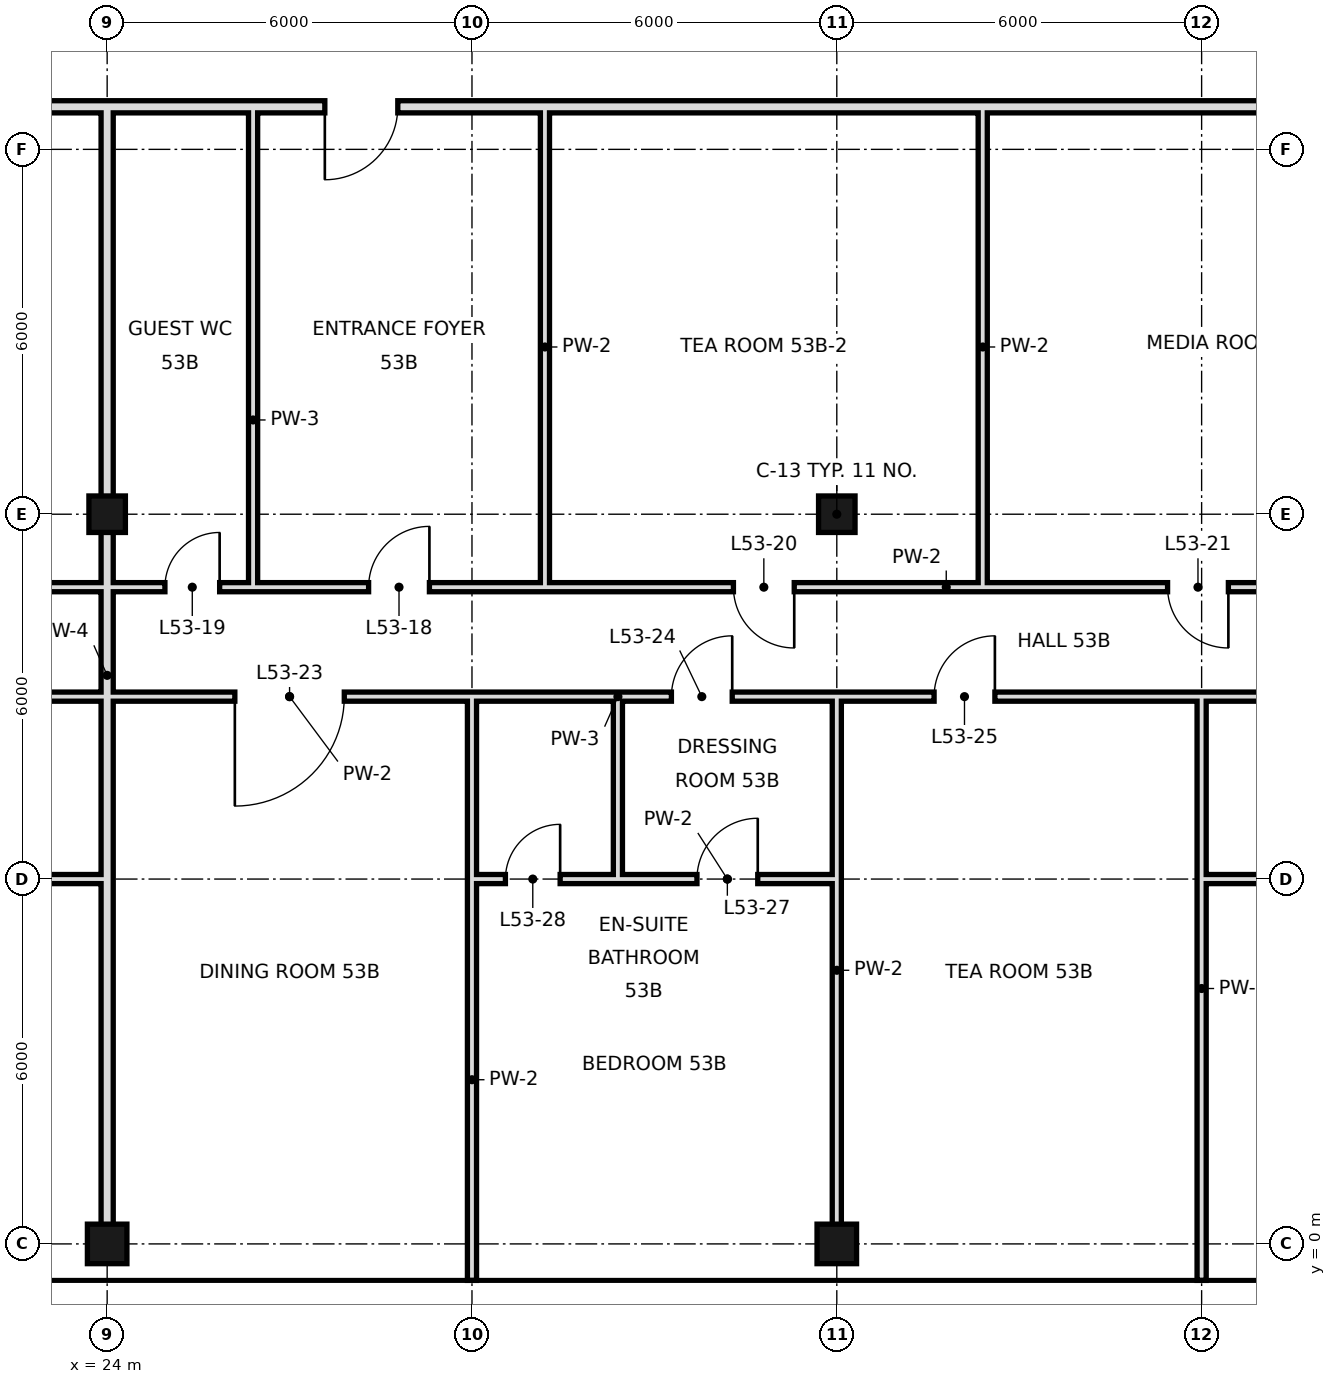
"""IFC4 building model, lengths in metres.
Left out: names, types, materials, properties, quantities, classifications, styles, units other than length and angle.
Written with IfcOpenShell. Run it as: python <this file> out.ifc"""

import sys

from ifc_helpers import new_model, si_unit, direction, frame, frame_2d, origin, origin_2d, place, context, subcontext, project, spatial, rectangle, hollow_rectangle, extrude, element, fill, save


model = new_model("IFC4")
c1 = context("Model", 3, precision=1e-05, world=origin(), true_north=direction((0.0, 1.0)))
c2 = subcontext(c1, "Body", "Model", "MODEL_VIEW")
j1 = project(units=[si_unit("LENGTHUNIT", "METRE"), si_unit("PLANEANGLEUNIT", "RADIAN")], contexts=[c1])
p1 = place(None, origin())
s1 = spatial("IfcSite", under=j1, at=p1, CompositionType="ELEMENT")
p2 = place(p1, origin())
s2 = spatial("IfcBuilding", under=s1, at=p2, CompositionType="ELEMENT")
p3 = place(p2, frame((0.0, 0.0, 226.2)))
s3 = spatial("IfcBuildingStorey", under=s2, at=p3, CompositionType="ELEMENT", Elevation=226.2)
p4 = place(p3, frame((24.0, 0.0, 0.0), z_axis=(0.0, 0.0, 1.0), x_axis=(1.0, 0.0, 0.0)))
e1 = element("IfcColumn", 1, at=p4, inside=s3, PredefinedType="COLUMN", context=c2, shape_type="SweptSolid", body=[
    extrude(hollow_rectangle(XDim=0.65, YDim=0.65, WallThickness=0.032, at=origin_2d()), origin(), (0.0, 0.0, 1.0), 3.6),
])
p5 = place(p3, frame((24.0, 12.0, 0.0), z_axis=(0.0, 0.0, 1.0), x_axis=(1.0, 0.0, 0.0)))
e2 = element("IfcColumn", 2, at=p5, inside=s3, PredefinedType="COLUMN", context=c2, shape_type="SweptSolid", body=[
    extrude(hollow_rectangle(XDim=0.6, YDim=0.6, WallThickness=0.028, at=origin_2d()), origin(), (0.0, 0.0, 1.0), 3.6),
])
p6 = place(p3, frame((36.0, 0.0, 0.0), z_axis=(0.0, 0.0, 1.0), x_axis=(1.0, 0.0, 0.0)))
e3 = element("IfcColumn", 3, at=p6, inside=s3, PredefinedType="COLUMN", context=c2, shape_type="SweptSolid", body=[
    extrude(hollow_rectangle(XDim=0.65, YDim=0.65, WallThickness=0.032, at=origin_2d()), origin(), (0.0, 0.0, 1.0), 3.6),
])
p7 = place(p3, frame((36.0, 12.0, 0.0), z_axis=(0.0, 0.0, 1.0), x_axis=(1.0, 0.0, 0.0)))
e4 = element("IfcColumn", 4, at=p7, inside=s3, PredefinedType="COLUMN", context=c2, shape_type="SweptSolid", body=[
    extrude(hollow_rectangle(XDim=0.6, YDim=0.6, WallThickness=0.028, at=origin_2d()), origin(), (0.0, 0.0, 1.0), 3.6),
])
p8 = place(p3, frame((24.0, 0.0, 0.0), z_axis=(0.0, 0.0, 1.0), x_axis=(0.0, 1.0, 0.0)))
e5 = element("IfcWall", 5, at=p8, inside=s3, PredefinedType="SOLIDWALL", context=c2, shape_type="SweptSolid", body=[
    extrude(rectangle(XDim=18.7, YDim=0.2, at=frame_2d((9.35, 0.0))), origin(), (0.0, 0.0, 1.0), 2.72),
])
p9 = place(p3, frame((26.4, 10.8, 0.0), z_axis=(0.0, 0.0, 1.0), x_axis=(0.0, 1.0, 0.0)))
e6 = element("IfcWall", 6, at=p9, inside=s3, PredefinedType="PARTITIONING", context=c2, shape_type="SweptSolid", body=[
    extrude(rectangle(XDim=7.9, YDim=0.15, at=frame_2d((3.95, 0.0))), origin(), (0.0, 0.0, 1.0), 3.42),
])
p10 = place(p3, frame((30.0, -0.6, 0.0), z_axis=(0.0, 0.0, 1.0), x_axis=(0.0, 1.0, 0.0)))
e7 = element("IfcWall", 7, at=p10, inside=s3, PredefinedType="PARTITIONING", context=c2, shape_type="SweptSolid", body=[
    extrude(rectangle(XDim=6.6, YDim=0.15, at=frame_2d((3.3, 0.0))), origin(), (0.0, 0.0, 1.0), 2.72),
])
p11 = place(p3, frame((30.0, 6.0, 0.0), z_axis=(0.0, 0.0, 1.0), x_axis=(0.0, 1.0, 0.0)))
e8 = element("IfcWall", 8, at=p11, inside=s3, PredefinedType="PARTITIONING", context=c2, shape_type="SweptSolid", body=[
    extrude(rectangle(XDim=3.0, YDim=0.15, at=frame_2d((1.5, 0.0))), origin(), (0.0, 0.0, 1.0), 2.72),
])
p12 = place(p3, frame((31.2, 10.8, 0.0), z_axis=(0.0, 0.0, 1.0), x_axis=(0.0, 1.0, 0.0)))
e9 = element("IfcWall", 9, at=p12, inside=s3, PredefinedType="PARTITIONING", context=c2, shape_type="SweptSolid", body=[
    extrude(rectangle(XDim=7.9, YDim=0.15, at=frame_2d((3.95, 0.0))), origin(), (0.0, 0.0, 1.0), 3.42),
])
p13 = place(p3, frame((32.4, 6.0, 0.0), z_axis=(0.0, 0.0, 1.0), x_axis=(0.0, 1.0, 0.0)))
e10 = element("IfcWall", 10, at=p13, inside=s3, PredefinedType="PARTITIONING", context=c2, shape_type="SweptSolid", body=[
    extrude(rectangle(XDim=3.0, YDim=0.15, at=frame_2d((1.5, 0.0))), origin(), (0.0, 0.0, 1.0), 3.42),
])
p14 = place(p3, frame((36.0, 0.0, 0.0), z_axis=(0.0, 0.0, 1.0), x_axis=(0.0, 1.0, 0.0)))
e11 = element("IfcWall", 11, at=p14, inside=s3, PredefinedType="PARTITIONING", context=c2, shape_type="SweptSolid", body=[
    extrude(rectangle(XDim=9.0, YDim=0.15, at=frame_2d((4.5, 0.0))), origin(), (0.0, 0.0, 1.0), 2.72),
])
p15 = place(p3, frame((38.4, 10.8, 0.0), z_axis=(0.0, 0.0, 1.0), x_axis=(0.0, 1.0, 0.0)))
e12 = element("IfcWall", 12, at=p15, inside=s3, PredefinedType="PARTITIONING", context=c2, shape_type="SweptSolid", body=[
    extrude(rectangle(XDim=7.9, YDim=0.15, at=frame_2d((3.95, 0.0))), origin(), (0.0, 0.0, 1.0), 3.42),
])
p16 = place(p3, frame((42.0, -0.6, 0.0), z_axis=(0.0, 0.0, 1.0), x_axis=(0.0, 1.0, 0.0)))
e13 = element("IfcWall", 13, at=p16, inside=s3, PredefinedType="PARTITIONING", context=c2, shape_type="SweptSolid", body=[
    extrude(rectangle(XDim=9.6, YDim=0.15, at=frame_2d((4.8, 0.0))), origin(), (0.0, 0.0, 1.0), 2.72),
])
p17 = place(p3, frame((7.2, 10.8, 0.0), z_axis=(0.0, 0.0, 1.0), x_axis=(1.0, 0.0, 0.0)))
e14 = element("IfcWall", 14, at=p17, inside=s3, PredefinedType="PARTITIONING", context=c2, shape_type="SweptSolid", body=[
    extrude(rectangle(XDim=16.8, YDim=0.15, at=frame_2d((8.4, 0.0))), origin(), (0.0, 0.0, 1.0), 3.42),
])
p18 = place(p17, frame((1.6, 0.0, 0.0)))
e15 = element("IfcOpeningElement", 15, at=p18, cuts=e14, PredefinedType="OPENING", context=c2, shape_type="SweptSolid", body=[
    extrude(rectangle(XDim=1.0, YDim=2.4, at=frame_2d((0.5, 1.2))), frame((0.0, 0.085, 0.0), z_axis=(0.0, -1.0, 0.0), x_axis=(1.0, 0.0, 0.0)), (0.0, 0.0, 1.0), 0.17),
])
p19 = place(p17, frame((10.9, 0.0, 0.0)))
e16 = element("IfcOpeningElement", 16, at=p19, cuts=e14, PredefinedType="OPENING", context=c2, shape_type="SweptSolid", body=[
    extrude(rectangle(XDim=1.0, YDim=2.4, at=frame_2d((0.5, 1.2))), frame((0.0, 0.085, 0.0), z_axis=(0.0, -1.0, 0.0), x_axis=(1.0, 0.0, 0.0)), (0.0, 0.0, 1.0), 0.17),
])
p20 = place(p3, frame((26.4, 10.8, 0.0), z_axis=(0.0, 0.0, 1.0), x_axis=(1.0, 0.0, 0.0)))
e17 = element("IfcWall", 17, at=p20, inside=s3, PredefinedType="PARTITIONING", context=c2, shape_type="SweptSolid", body=[
    extrude(rectangle(XDim=22.8, YDim=0.15, at=frame_2d((11.4, 0.0))), origin(), (0.0, 0.0, 1.0), 3.42),
])
p21 = place(p20, frame((1.9, 0.0, 0.0)))
e18 = element("IfcOpeningElement", 18, at=p21, cuts=e17, PredefinedType="OPENING", context=c2, shape_type="SweptSolid", body=[
    extrude(rectangle(XDim=1.0, YDim=2.4, at=frame_2d((0.5, 1.2))), frame((0.0, 0.085, 0.0), z_axis=(0.0, -1.0, 0.0), x_axis=(1.0, 0.0, 0.0)), (0.0, 0.0, 1.0), 0.17),
])
p22 = place(p20, frame((7.9, 0.0, 0.0)))
e19 = element("IfcOpeningElement", 19, at=p22, cuts=e17, PredefinedType="OPENING", context=c2, shape_type="SweptSolid", body=[
    extrude(rectangle(XDim=1.0, YDim=2.4, at=frame_2d((0.5, 1.2))), frame((0.0, 0.085, 0.0), z_axis=(0.0, -1.0, 0.0), x_axis=(1.0, 0.0, 0.0)), (0.0, 0.0, 1.0), 0.17),
])
p23 = place(p20, frame((15.04, 0.0, 0.0)))
e20 = element("IfcOpeningElement", 20, at=p23, cuts=e17, PredefinedType="OPENING", context=c2, shape_type="SweptSolid", body=[
    extrude(rectangle(XDim=1.0, YDim=2.4, at=frame_2d((0.5, 1.2))), frame((0.0, 0.085, 0.0), z_axis=(0.0, -1.0, 0.0), x_axis=(1.0, 0.0, 0.0)), (0.0, 0.0, 1.0), 0.17),
])
p24 = place(p3, frame((24.0, 10.8, 0.0), z_axis=(0.0, 0.0, 1.0), x_axis=(1.0, 0.0, 0.0)))
e21 = element("IfcWall", 21, at=p24, inside=s3, PredefinedType="PARTITIONING", context=c2, shape_type="SweptSolid", body=[
    extrude(rectangle(XDim=2.4, YDim=0.15, at=frame_2d((1.2, 0.0))), origin(), (0.0, 0.0, 1.0), 3.42),
])
p25 = place(p24, frame((0.95, 0.0, 0.0)))
e22 = element("IfcOpeningElement", 22, at=p25, cuts=e21, PredefinedType="OPENING", context=c2, shape_type="SweptSolid", body=[
    extrude(rectangle(XDim=0.9, YDim=2.4, at=frame_2d((0.45, 1.2))), frame((0.0, 0.085, 0.0), z_axis=(0.0, -1.0, 0.0), x_axis=(1.0, 0.0, 0.0)), (0.0, 0.0, 1.0), 0.17),
])
p26 = place(p3, frame((3.1, 18.7, 0.0), z_axis=(0.0, 0.0, 1.0), x_axis=(1.0, 0.0, 0.0)))
e23 = element("IfcWall", 23, at=p26, inside=s3, PredefinedType="SOLIDWALL", context=c2, shape_type="SweptSolid", body=[
    extrude(rectangle(XDim=41.8, YDim=0.2, at=frame_2d((20.9, 0.0))), origin(), (0.0, 0.0, 1.0), 2.72),
])
p27 = place(p26, frame((7.36, 0.0, 0.0)))
e24 = element("IfcOpeningElement", 24, at=p27, cuts=e23, PredefinedType="OPENING", context=c2, shape_type="SweptSolid", body=[
    extrude(rectangle(XDim=1.2, YDim=2.4, at=frame_2d((0.6, 1.2))), frame((0.0, 0.11, 0.0), z_axis=(0.0, -1.0, 0.0), x_axis=(1.0, 0.0, 0.0)), (0.0, 0.0, 1.0), 0.22),
])
p28 = place(p26, frame((24.48, 0.0, 0.0)))
e25 = element("IfcOpeningElement", 25, at=p28, cuts=e23, PredefinedType="OPENING", context=c2, shape_type="SweptSolid", body=[
    extrude(rectangle(XDim=1.2, YDim=2.4, at=frame_2d((0.6, 1.2))), frame((0.0, 0.11, 0.0), z_axis=(0.0, -1.0, 0.0), x_axis=(1.0, 0.0, 0.0)), (0.0, 0.0, 1.0), 0.22),
])
p29 = place(p3, frame((32.4, 6.0, 0.0), z_axis=(0.0, 0.0, 1.0), x_axis=(1.0, 0.0, 0.0)))
e26 = element("IfcWall", 26, at=p29, inside=s3, PredefinedType="PARTITIONING", context=c2, shape_type="SweptSolid", body=[
    extrude(rectangle(XDim=3.6, YDim=0.15, at=frame_2d((1.8, 0.0))), origin(), (0.0, 0.0, 1.0), 2.97),
])
p30 = place(p29, frame((1.3, 0.0, 0.0)))
e27 = element("IfcOpeningElement", 27, at=p30, cuts=e26, PredefinedType="OPENING", context=c2, shape_type="SweptSolid", body=[
    extrude(rectangle(XDim=1.0, YDim=2.4, at=frame_2d((0.5, 1.2))), frame((0.0, 0.085, 0.0), z_axis=(0.0, -1.0, 0.0), x_axis=(1.0, 0.0, 0.0)), (0.0, 0.0, 1.0), 0.17),
])
p31 = place(p3, frame((42.0, 6.0, 0.0), z_axis=(0.0, 0.0, 1.0), x_axis=(1.0, 0.0, 0.0)))
e28 = element("IfcWall", 28, at=p31, inside=s3, PredefinedType="PARTITIONING", context=c2, shape_type="SweptSolid", body=[
    extrude(rectangle(XDim=12.0, YDim=0.15, at=frame_2d((6.0, 0.0))), origin(), (0.0, 0.0, 1.0), 2.97),
])
p32 = place(p31, frame((3.16, 0.0, 0.0)))
e29 = element("IfcOpeningElement", 29, at=p32, cuts=e28, PredefinedType="OPENING", context=c2, shape_type="SweptSolid", body=[
    extrude(rectangle(XDim=1.8, YDim=2.4, at=frame_2d((0.9, 1.2))), frame((0.0, 0.085, 0.0), z_axis=(0.0, -1.0, 0.0), x_axis=(1.0, 0.0, 0.0)), (0.0, 0.0, 1.0), 0.17),
])
p33 = place(p3, frame((20.4, 6.0, 0.0), z_axis=(0.0, 0.0, 1.0), x_axis=(1.0, 0.0, 0.0)))
e30 = element("IfcWall", 30, at=p33, inside=s3, PredefinedType="PARTITIONING", context=c2, shape_type="SweptSolid", body=[
    extrude(rectangle(XDim=3.6, YDim=0.15, at=frame_2d((1.8, 0.0))), origin(), (0.0, 0.0, 1.0), 2.97),
])
p34 = place(p33, frame((0.25, 0.0, 0.0)))
e31 = element("IfcOpeningElement", 31, at=p34, cuts=e30, PredefinedType="OPENING", context=c2, shape_type="SweptSolid", body=[
    extrude(rectangle(XDim=0.9, YDim=2.4, at=frame_2d((0.45, 1.2))), frame((0.0, 0.085, 0.0), z_axis=(0.0, -1.0, 0.0), x_axis=(1.0, 0.0, 0.0)), (0.0, 0.0, 1.0), 0.17),
])
p35 = place(p3, frame((30.0, 6.0, 0.0), z_axis=(0.0, 0.0, 1.0), x_axis=(1.0, 0.0, 0.0)))
e32 = element("IfcWall", 32, at=p35, inside=s3, PredefinedType="PARTITIONING", context=c2, shape_type="SweptSolid", body=[
    extrude(rectangle(XDim=2.4, YDim=0.15, at=frame_2d((1.2, 0.0))), origin(), (0.0, 0.0, 1.0), 2.97),
])
p36 = place(p35, frame((0.55, 0.0, 0.0)))
e33 = element("IfcOpeningElement", 33, at=p36, cuts=e32, PredefinedType="OPENING", context=c2, shape_type="SweptSolid", body=[
    extrude(rectangle(XDim=0.9, YDim=2.4, at=frame_2d((0.45, 1.2))), frame((0.0, 0.085, 0.0), z_axis=(0.0, -1.0, 0.0), x_axis=(1.0, 0.0, 0.0)), (0.0, 0.0, 1.0), 0.17),
])
p37 = place(p3, frame((24.0, 9.0, 0.0), z_axis=(0.0, 0.0, 1.0), x_axis=(1.0, 0.0, 0.0)))
e34 = element("IfcWall", 34, at=p37, inside=s3, PredefinedType="PARTITIONING", context=c2, shape_type="SweptSolid", body=[
    extrude(rectangle(XDim=6.0, YDim=0.15, at=frame_2d((3.0, 0.0))), origin(), (0.0, 0.0, 1.0), 3.42),
])
p38 = place(p37, frame((2.1, 0.0, 0.0)))
e35 = element("IfcOpeningElement", 35, at=p38, cuts=e34, PredefinedType="OPENING", context=c2, shape_type="SweptSolid", body=[
    extrude(rectangle(XDim=1.8, YDim=2.4, at=frame_2d((0.9, 1.2))), frame((0.0, 0.085, 0.0), z_axis=(0.0, -1.0, 0.0), x_axis=(1.0, 0.0, 0.0)), (0.0, 0.0, 1.0), 0.17),
])
p39 = place(p3, frame((32.4, 9.0, 0.0), z_axis=(0.0, 0.0, 1.0), x_axis=(1.0, 0.0, 0.0)))
e36 = element("IfcWall", 36, at=p39, inside=s3, PredefinedType="PARTITIONING", context=c2, shape_type="SweptSolid", body=[
    extrude(rectangle(XDim=22.2, YDim=0.15, at=frame_2d((11.1, 0.0))), origin(), (0.0, 0.0, 1.0), 3.42),
])
p40 = place(p39, frame((0.88, 0.0, 0.0)))
e37 = element("IfcOpeningElement", 37, at=p40, cuts=e36, PredefinedType="OPENING", context=c2, shape_type="SweptSolid", body=[
    extrude(rectangle(XDim=1.0, YDim=2.4, at=frame_2d((0.5, 1.2))), frame((0.0, 0.085, 0.0), z_axis=(0.0, -1.0, 0.0), x_axis=(1.0, 0.0, 0.0)), (0.0, 0.0, 1.0), 0.17),
])
p41 = place(p39, frame((5.2, 0.0, 0.0)))
e38 = element("IfcOpeningElement", 38, at=p41, cuts=e36, PredefinedType="OPENING", context=c2, shape_type="SweptSolid", body=[
    extrude(rectangle(XDim=1.0, YDim=2.4, at=frame_2d((0.5, 1.2))), frame((0.0, 0.085, 0.0), z_axis=(0.0, -1.0, 0.0), x_axis=(1.0, 0.0, 0.0)), (0.0, 0.0, 1.0), 0.17),
])
p42 = place(p39, frame((16.64, 0.0, 0.0)))
e39 = element("IfcOpeningElement", 39, at=p42, cuts=e36, PredefinedType="OPENING", context=c2, shape_type="SweptSolid", body=[
    extrude(rectangle(XDim=1.8, YDim=2.4, at=frame_2d((0.9, 1.2))), frame((0.0, 0.085, 0.0), z_axis=(0.0, -1.0, 0.0), x_axis=(1.0, 0.0, 0.0)), (0.0, 0.0, 1.0), 0.17),
])
p43 = place(p3, frame((20.4, 9.0, 0.0), z_axis=(0.0, 0.0, 1.0), x_axis=(1.0, 0.0, 0.0)))
e40 = element("IfcWall", 40, at=p43, inside=s3, PredefinedType="PARTITIONING", context=c2, shape_type="SweptSolid", body=[
    extrude(rectangle(XDim=3.6, YDim=0.15, at=frame_2d((1.8, 0.0))), origin(), (0.0, 0.0, 1.0), 3.42),
])
p44 = place(p3, frame((30.0, 9.0, 0.0), z_axis=(0.0, 0.0, 1.0), x_axis=(1.0, 0.0, 0.0)))
e41 = element("IfcWall", 41, at=p44, inside=s3, PredefinedType="PARTITIONING", context=c2, shape_type="SweptSolid", body=[
    extrude(rectangle(XDim=2.4, YDim=0.15, at=frame_2d((1.2, 0.0))), origin(), (0.0, 0.0, 1.0), 3.42),
])
p45 = place(p21, frame((1.0, 0.0, 0.0), z_axis=(0.0, 0.0, 1.0), x_axis=(-1.0, 0.0, 0.0)))
e42 = element("IfcDoor", 42, at=p45, inside=s3, OperationType="SINGLE_SWING_LEFT", PredefinedType="DOOR", context=c2, shape_type="SweptSolid", body=[
    extrude(rectangle(XDim=1.0, YDim=2.4, at=frame_2d((0.5, 1.2))), frame((0.0, 0.025, 0.0), z_axis=(0.0, -1.0, 0.0), x_axis=(1.0, 0.0, 0.0)), (0.0, 0.0, 1.0), 0.05),
])
fill(e18, e42)
p46 = place(p25, frame((0.9, 0.0, 0.0), z_axis=(0.0, 0.0, 1.0), x_axis=(-1.0, 0.0, 0.0)))
e43 = element("IfcDoor", 43, at=p46, inside=s3, OperationType="SINGLE_SWING_LEFT", PredefinedType="DOOR", context=c2, shape_type="SweptSolid", body=[
    extrude(rectangle(XDim=0.9, YDim=2.4, at=frame_2d((0.45, 1.2))), frame((0.0, 0.025, 0.0), z_axis=(0.0, -1.0, 0.0), x_axis=(1.0, 0.0, 0.0)), (0.0, 0.0, 1.0), 0.05),
])
fill(e22, e43)
p47 = place(p22, origin())
e44 = element("IfcDoor", 44, at=p47, inside=s3, OperationType="SINGLE_SWING_RIGHT", PredefinedType="DOOR", context=c2, shape_type="SweptSolid", body=[
    extrude(rectangle(XDim=1.0, YDim=2.4, at=frame_2d((0.5, 1.2))), frame((0.0, 0.025, 0.0), z_axis=(0.0, -1.0, 0.0), x_axis=(1.0, 0.0, 0.0)), (0.0, 0.0, 1.0), 0.05),
])
fill(e19, e44)
p48 = place(p23, origin())
e45 = element("IfcDoor", 45, at=p48, inside=s3, OperationType="SINGLE_SWING_RIGHT", PredefinedType="DOOR", context=c2, shape_type="SweptSolid", body=[
    extrude(rectangle(XDim=1.0, YDim=2.4, at=frame_2d((0.5, 1.2))), frame((0.0, 0.025, 0.0), z_axis=(0.0, -1.0, 0.0), x_axis=(1.0, 0.0, 0.0)), (0.0, 0.0, 1.0), 0.05),
])
fill(e20, e45)
p49 = place(p38, frame((1.8, 0.0, 0.0), z_axis=(0.0, 0.0, 1.0), x_axis=(-1.0, 0.0, 0.0)))
e46 = element("IfcDoor", 46, at=p49, inside=s3, OperationType="SINGLE_SWING_RIGHT", PredefinedType="DOOR", context=c2, shape_type="SweptSolid", body=[
    extrude(rectangle(XDim=1.8, YDim=2.4, at=frame_2d((0.9, 1.2))), frame((0.0, 0.025, 0.0), z_axis=(0.0, -1.0, 0.0), x_axis=(1.0, 0.0, 0.0)), (0.0, 0.0, 1.0), 0.05),
])
fill(e35, e46)
p50 = place(p40, frame((1.0, 0.0, 0.0), z_axis=(0.0, 0.0, 1.0), x_axis=(-1.0, 0.0, 0.0)))
e47 = element("IfcDoor", 47, at=p50, inside=s3, OperationType="SINGLE_SWING_LEFT", PredefinedType="DOOR", context=c2, shape_type="SweptSolid", body=[
    extrude(rectangle(XDim=1.0, YDim=2.4, at=frame_2d((0.5, 1.2))), frame((0.0, 0.025, 0.0), z_axis=(0.0, -1.0, 0.0), x_axis=(1.0, 0.0, 0.0)), (0.0, 0.0, 1.0), 0.05),
])
fill(e37, e47)
p51 = place(p41, frame((1.0, 0.0, 0.0), z_axis=(0.0, 0.0, 1.0), x_axis=(-1.0, 0.0, 0.0)))
e48 = element("IfcDoor", 48, at=p51, inside=s3, OperationType="SINGLE_SWING_LEFT", PredefinedType="DOOR", context=c2, shape_type="SweptSolid", body=[
    extrude(rectangle(XDim=1.0, YDim=2.4, at=frame_2d((0.5, 1.2))), frame((0.0, 0.025, 0.0), z_axis=(0.0, -1.0, 0.0), x_axis=(1.0, 0.0, 0.0)), (0.0, 0.0, 1.0), 0.05),
])
fill(e38, e48)
p52 = place(p30, frame((1.0, 0.0, 0.0), z_axis=(0.0, 0.0, 1.0), x_axis=(-1.0, 0.0, 0.0)))
e49 = element("IfcDoor", 49, at=p52, inside=s3, OperationType="SINGLE_SWING_LEFT", PredefinedType="DOOR", context=c2, shape_type="SweptSolid", body=[
    extrude(rectangle(XDim=1.0, YDim=2.4, at=frame_2d((0.5, 1.2))), frame((0.0, 0.025, 0.0), z_axis=(0.0, -1.0, 0.0), x_axis=(1.0, 0.0, 0.0)), (0.0, 0.0, 1.0), 0.05),
])
fill(e27, e49)
p53 = place(p36, frame((0.9, 0.0, 0.0), z_axis=(0.0, 0.0, 1.0), x_axis=(-1.0, 0.0, 0.0)))
e50 = element("IfcDoor", 50, at=p53, inside=s3, OperationType="SINGLE_SWING_LEFT", PredefinedType="DOOR", context=c2, shape_type="SweptSolid", body=[
    extrude(rectangle(XDim=0.9, YDim=2.4, at=frame_2d((0.45, 1.2))), frame((0.0, 0.025, 0.0), z_axis=(0.0, -1.0, 0.0), x_axis=(1.0, 0.0, 0.0)), (0.0, 0.0, 1.0), 0.05),
])
fill(e33, e50)
p54 = place(p28, frame((1.2, 0.0, 0.0), z_axis=(0.0, 0.0, 1.0), x_axis=(-1.0, 0.0, 0.0)))
e51 = element("IfcDoor", 51, at=p54, inside=s3, OperationType="SINGLE_SWING_RIGHT", PredefinedType="DOOR", context=c2, shape_type="SweptSolid", body=[
    extrude(rectangle(XDim=1.2, YDim=2.4, at=frame_2d((0.6, 1.2))), frame((0.0, 0.025, 0.0), z_axis=(0.0, -1.0, 0.0), x_axis=(1.0, 0.0, 0.0)), (0.0, 0.0, 1.0), 0.05),
])
fill(e25, e51)
save(model, sys.argv[1])
